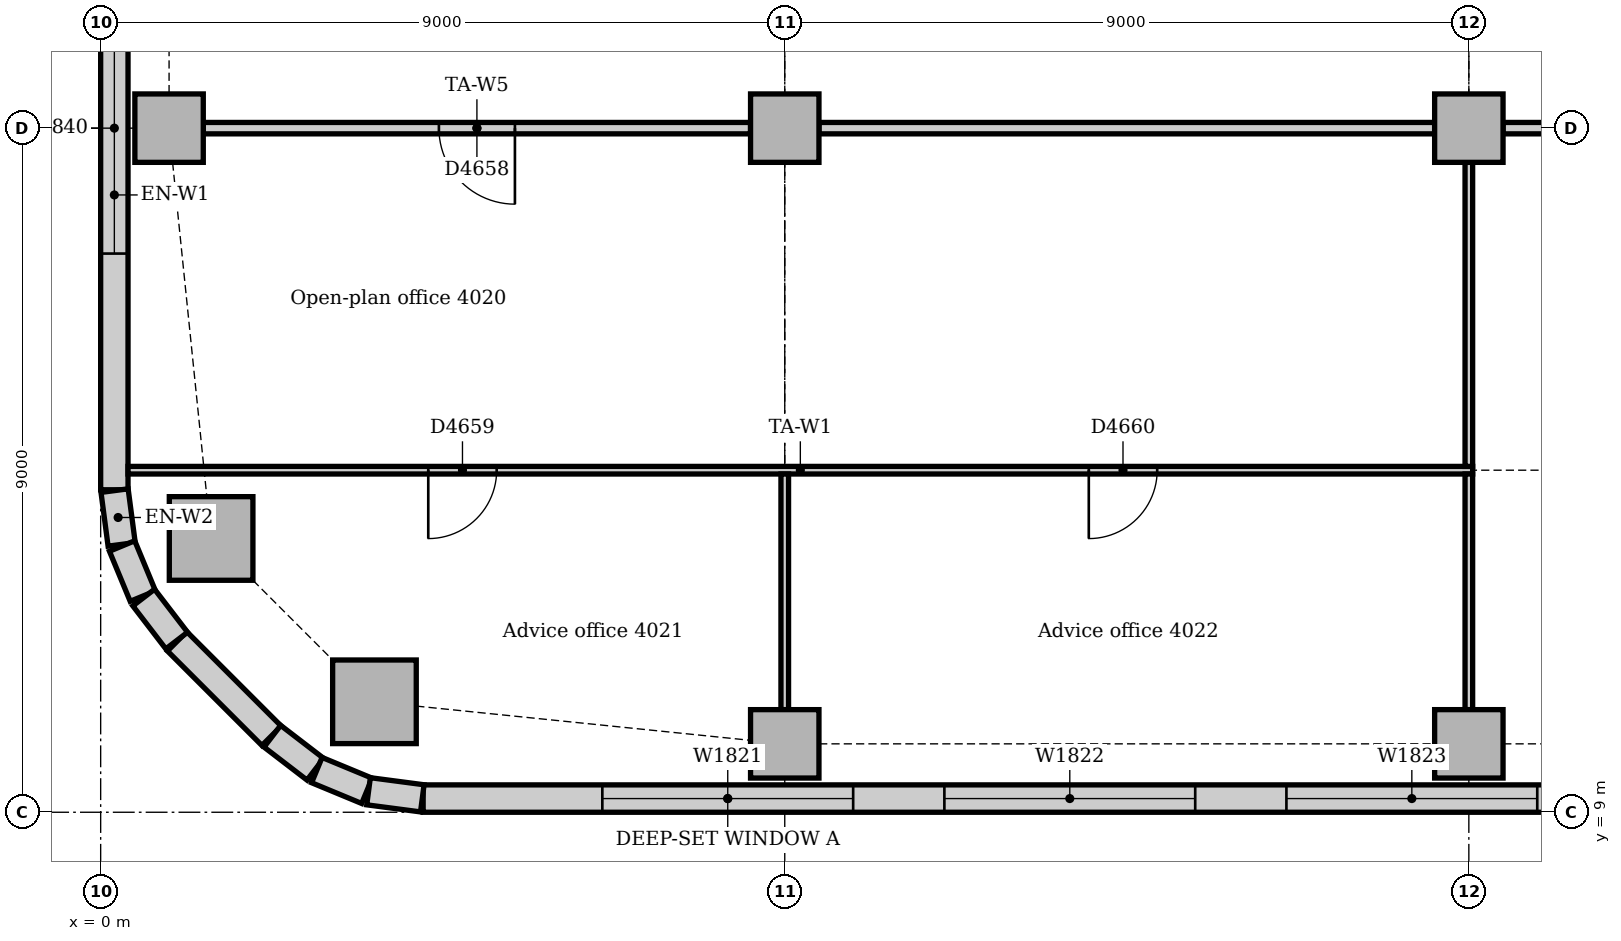
"""IFC4 building model, lengths in metres.
Left out: names, types, materials, properties, quantities, classifications, styles, units other than length and angle.
Written with IfcOpenShell. Run it as: python <this file> out.ifc"""

import sys

from ifc_helpers import new_model, si_unit, direction, frame, frame_2d, origin, origin_2d, place, context, subcontext, project, spatial, rectangle, extrude, element, fill, save


model = new_model("IFC4")
c1 = context("Model", 3, precision=1e-05, world=origin(), true_north=direction((0.0, 1.0)))
c2 = subcontext(c1, "Body", "Model", "MODEL_VIEW")
j1 = project(units=[si_unit("LENGTHUNIT", "METRE"), si_unit("PLANEANGLEUNIT", "RADIAN")], contexts=[c1])
p1 = place(None, origin())
s1 = spatial("IfcSite", under=j1, at=p1, CompositionType="ELEMENT")
p2 = place(p1, origin())
s2 = spatial("IfcBuilding", under=s1, at=p2, CompositionType="ELEMENT")
p3 = place(p2, frame((0.0, 0.0, 169.0)))
s3 = spatial("IfcBuildingStorey", under=s2, at=p3, CompositionType="ELEMENT", Elevation=169.0)
for number, where, z_axis, x_axis in (
    (1, (3.602, 10.453, 0.0), (0.0, 0.0, 1.0), (1.0, 0.0, 0.0)),
    (2, (1.453, 12.602, 0.0), (0.0, 0.0, 1.0), (1.0, 0.0, 0.0)),
):
    element("IfcColumn", number, at=place(p3, frame(where, z_axis=z_axis, x_axis=x_axis)), inside=s3, PredefinedType="COLUMN", context=c2, shape_type="SweptSolid", body=[
        extrude(rectangle(XDim=1.1, YDim=1.1, at=origin_2d()), origin(), (0.0, 0.0, 1.0), 3.85),
    ])
for number, where, z_axis, x_axis in (
    (3, (9.0, 9.9, 0.0), (0.0, 0.0, 1.0), (1.0, 0.0, 0.0)),
    (4, (18.0, 9.9, 0.0), (0.0, 0.0, 1.0), (1.0, 0.0, 0.0)),
    (5, (0.9, 18.0, 0.0), (0.0, 0.0, 1.0), (1.0, 0.0, 0.0)),
    (6, (9.0, 18.0, 0.0), (0.0, 0.0, 1.0), (1.0, 0.0, 0.0)),
    (7, (18.0, 18.0, 0.0), (0.0, 0.0, 1.0), (1.0, 0.0, 0.0)),
):
    element("IfcColumn", number, at=place(p3, frame(where, z_axis=z_axis, x_axis=x_axis)), inside=s3, PredefinedType="COLUMN", context=c2, shape_type="SweptSolid", body=[
        extrude(rectangle(XDim=0.9, YDim=0.9, at=origin_2d()), origin(), (0.0, 0.0, 1.0), 3.85),
    ])
p4 = place(p3, frame((4.243, 9.18, 0.0), z_axis=(0.0, 0.0, 1.0), x_axis=(1.0, 0.0, 0.0)))
e8 = element("IfcWall", 8, at=p4, inside=s3, PredefinedType="STANDARD", context=c2, shape_type="SweptSolid", body=[
    extrude(rectangle(XDim=30.515, YDim=0.36, at=frame_2d((15.257, 0.0))), origin(), (0.0, 0.0, 1.0), 3.85),
])
p5 = place(p4, frame((2.357, 0.0, 0.9)))
e9 = element("IfcOpeningElement", 9, at=p5, cuts=e8, PredefinedType="OPENING", context=c2, shape_type="SweptSolid", body=[
    extrude(rectangle(XDim=3.3, YDim=1.6, at=frame_2d((1.65, 0.8))), frame((0.0, 0.19, 0.0), z_axis=(0.0, -1.0, 0.0), x_axis=(1.0, 0.0, 0.0)), (0.0, 0.0, 1.0), 0.38),
])
p6 = place(p4, frame((6.857, 0.0, 0.9)))
e10 = element("IfcOpeningElement", 10, at=p6, cuts=e8, PredefinedType="OPENING", context=c2, shape_type="SweptSolid", body=[
    extrude(rectangle(XDim=3.3, YDim=1.6, at=frame_2d((1.65, 0.8))), frame((0.0, 0.19, 0.0), z_axis=(0.0, -1.0, 0.0), x_axis=(1.0, 0.0, 0.0)), (0.0, 0.0, 1.0), 0.38),
])
p7 = place(p4, frame((11.357, 0.0, 0.9)))
e11 = element("IfcOpeningElement", 11, at=p7, cuts=e8, PredefinedType="OPENING", context=c2, shape_type="SweptSolid", body=[
    extrude(rectangle(XDim=3.3, YDim=1.6, at=frame_2d((1.65, 0.8))), frame((0.0, 0.19, 0.0), z_axis=(0.0, -1.0, 0.0), x_axis=(1.0, 0.0, 0.0)), (0.0, 0.0, 1.0), 0.38),
])
p8 = place(p4, frame((15.857, 0.0, 0.9)))
e12 = element("IfcOpeningElement", 12, at=p8, cuts=e8, PredefinedType="OPENING", context=c2, shape_type="SweptSolid", body=[
    extrude(rectangle(XDim=3.3, YDim=1.6, at=frame_2d((1.65, 0.8))), frame((0.0, 0.19, 0.0), z_axis=(0.0, -1.0, 0.0), x_axis=(1.0, 0.0, 0.0)), (0.0, 0.0, 1.0), 0.38),
])
p9 = place(p4, frame((20.357, 0.0, 0.9)))
e13 = element("IfcOpeningElement", 13, at=p9, cuts=e8, PredefinedType="OPENING", context=c2, shape_type="SweptSolid", body=[
    extrude(rectangle(XDim=3.3, YDim=1.6, at=frame_2d((1.65, 0.8))), frame((0.0, 0.19, 0.0), z_axis=(0.0, -1.0, 0.0), x_axis=(1.0, 0.0, 0.0)), (0.0, 0.0, 1.0), 0.38),
])
p10 = place(p4, frame((25.307, 0.0, 0.9)))
e14 = element("IfcOpeningElement", 14, at=p10, cuts=e8, PredefinedType="OPENING", context=c2, shape_type="SweptSolid", body=[
    extrude(rectangle(XDim=1.8, YDim=1.6, at=frame_2d((0.9, 0.8))), frame((0.0, 0.19, 0.0), z_axis=(0.0, -1.0, 0.0), x_axis=(1.0, 0.0, 0.0)), (0.0, 0.0, 1.0), 0.38),
])
p11 = place(p3, frame((0.18, 21.0, 0.0), z_axis=(0.0, 0.0, 1.0), x_axis=(0.0, -1.0, 0.0)))
e15 = element("IfcWall", 15, at=p11, inside=s3, PredefinedType="STANDARD", context=c2, shape_type="SweptSolid", body=[
    extrude(rectangle(XDim=7.757, YDim=0.36, at=frame_2d((3.879, 0.0))), origin(), (0.0, 0.0, 1.0), 3.85),
])
p12 = place(p11, frame((1.35, 0.0, 0.9)))
e16 = element("IfcOpeningElement", 16, at=p12, cuts=e15, PredefinedType="OPENING", context=c2, shape_type="SweptSolid", body=[
    extrude(rectangle(XDim=3.3, YDim=1.6, at=frame_2d((1.65, 0.8))), frame((0.0, 0.19, 0.0), z_axis=(0.0, -1.0, 0.0), x_axis=(1.0, 0.0, 0.0)), (0.0, 0.0, 1.0), 0.38),
])
p13 = place(p3, frame((1.006, 11.249, 0.0), z_axis=(0.0, 0.0, 1.0), x_axis=(0.707106781187, -0.707106781187, 0.0)))
e17 = element("IfcWall", 17, at=p13, inside=s3, PredefinedType="STANDARD", context=c2, shape_type="SweptSolid", body=[
    extrude(rectangle(XDim=1.757, YDim=0.36, at=frame_2d((0.879, 0.0))), origin(), (0.0, 0.0, 1.0), 3.85),
])
for number, where, z_axis, x_axis in (
    (18, (0.183, 13.231, 0.0), (0.0, 0.0, 1.0), (0.131, -0.991, 0.0)),
    (19, (0.282, 12.503, 0.0), (0.0, 0.0, 1.0), (0.383, -0.924, 0.0)),
):
    element("IfcWall", number, at=place(p3, frame(where, z_axis=z_axis, x_axis=x_axis)), inside=s3, PredefinedType="STANDARD", context=c2, shape_type="SweptSolid", body=[
        extrude(rectangle(XDim=0.713, YDim=0.36, at=frame_2d((0.356, 0.0))), origin(), (0.0, 0.0, 1.0), 3.85),
    ])
for number, where, z_axis, x_axis in (
    (20, (0.566, 11.825, 0.0), (0.0, 0.0, 1.0), (0.609, -0.793, 0.0)),
    (21, (2.259, 10.0, 0.0), (0.0, 0.0, 1.0), (0.793, -0.609, 0.0)),
):
    element("IfcWall", number, at=place(p3, frame(where, z_axis=z_axis, x_axis=x_axis)), inside=s3, PredefinedType="STANDARD", context=c2, shape_type="SweptSolid", body=[
        extrude(rectangle(XDim=0.713, YDim=0.36, at=frame_2d((0.357, 0.0))), origin(), (0.0, 0.0, 1.0), 3.85),
    ])
for number, where, z_axis, x_axis in (
    (22, (2.844, 9.555, 0.0), (0.0, 0.0, 1.0), (0.924, -0.383, 0.0)),
    (23, (3.524, 9.276, 0.0), (0.0, 0.0, 1.0), (0.991, -0.131, 0.0)),
):
    element("IfcWall", number, at=place(p3, frame(where, z_axis=z_axis, x_axis=x_axis)), inside=s3, PredefinedType="STANDARD", context=c2, shape_type="SweptSolid", body=[
        extrude(rectangle(XDim=0.713, YDim=0.36, at=frame_2d((0.356, 0.0))), origin(), (0.0, 0.0, 1.0), 3.85),
    ])
p14 = place(p3, frame((1.35, 18.0, 0.0), z_axis=(0.0, 0.0, 1.0), x_axis=(1.0, 0.0, 0.0)))
e24 = element("IfcWall", 24, at=p14, inside=s3, PredefinedType="PARTITIONING", context=c2, shape_type="SweptSolid", body=[
    extrude(rectangle(XDim=7.2, YDim=0.15, at=frame_2d((3.6, 0.0))), origin(), (0.0, 0.0, 1.0), 3.262),
])
p15 = place(p14, frame((3.1, 0.0, 0.0)))
e25 = element("IfcOpeningElement", 25, at=p15, cuts=e24, PredefinedType="OPENING", context=c2, shape_type="SweptSolid", body=[
    extrude(rectangle(XDim=1.0, YDim=2.1, at=frame_2d((0.5, 1.05))), frame((0.0, 0.085, 0.0), z_axis=(0.0, -1.0, 0.0), x_axis=(1.0, 0.0, 0.0)), (0.0, 0.0, 1.0), 0.17),
])
p16 = place(p3, frame((9.45, 18.0, 0.0), z_axis=(0.0, 0.0, 1.0), x_axis=(1.0, 0.0, 0.0)))
e26 = element("IfcWall", 26, at=p16, inside=s3, PredefinedType="PARTITIONING", context=c2, shape_type="SweptSolid", body=[
    extrude(rectangle(XDim=8.1, YDim=0.15, at=frame_2d((4.05, 0.0))), origin(), (0.0, 0.0, 1.0), 3.262),
])
p17 = place(p3, frame((18.45, 18.0, 0.0), z_axis=(0.0, 0.0, 1.0), x_axis=(1.0, 0.0, 0.0)))
e27 = element("IfcWall", 27, at=p17, inside=s3, PredefinedType="PARTITIONING", context=c2, shape_type="SweptSolid", body=[
    extrude(rectangle(XDim=8.1, YDim=0.15, at=frame_2d((4.05, 0.0))), origin(), (0.0, 0.0, 1.0), 3.262),
])
p18 = place(p17, frame((3.6, 0.0, 0.0)))
e28 = element("IfcOpeningElement", 28, at=p18, cuts=e27, PredefinedType="OPENING", context=c2, shape_type="SweptSolid", body=[
    extrude(rectangle(XDim=0.9, YDim=2.1, at=frame_2d((0.45, 1.05))), frame((0.0, 0.085, 0.0), z_axis=(0.0, -1.0, 0.0), x_axis=(1.0, 0.0, 0.0)), (0.0, 0.0, 1.0), 0.17),
])
p19 = place(p3, frame((0.36, 13.5, 0.0), z_axis=(0.0, 0.0, 1.0), x_axis=(1.0, 0.0, 0.0)))
e29 = element("IfcWall", 29, at=p19, inside=s3, PredefinedType="PARTITIONING", context=c2, shape_type="SweptSolid", body=[
    extrude(rectangle(XDim=17.69, YDim=0.1, at=frame_2d((8.845, 0.0))), origin(), (0.0, 0.0, 1.0), 3.4),
])
p20 = place(p19, frame((3.95, 0.0, 0.0)))
e30 = element("IfcOpeningElement", 30, at=p20, cuts=e29, PredefinedType="OPENING", context=c2, shape_type="SweptSolid", body=[
    extrude(rectangle(XDim=0.9, YDim=2.1, at=frame_2d((0.45, 1.05))), frame((0.0, 0.06, 0.0), z_axis=(0.0, -1.0, 0.0), x_axis=(1.0, 0.0, 0.0)), (0.0, 0.0, 1.0), 0.12),
])
p21 = place(p19, frame((12.64, 0.0, 0.0)))
e31 = element("IfcOpeningElement", 31, at=p21, cuts=e29, PredefinedType="OPENING", context=c2, shape_type="SweptSolid", body=[
    extrude(rectangle(XDim=0.9, YDim=2.1, at=frame_2d((0.45, 1.05))), frame((0.0, 0.06, 0.0), z_axis=(0.0, -1.0, 0.0), x_axis=(1.0, 0.0, 0.0)), (0.0, 0.0, 1.0), 0.12),
])
p22 = place(p3, frame((18.0, 10.35, 0.0), z_axis=(0.0, 0.0, 1.0), x_axis=(0.0, 1.0, 0.0)))
e32 = element("IfcWall", 32, at=p22, inside=s3, PredefinedType="PARTITIONING", context=c2, shape_type="SweptSolid", body=[
    extrude(rectangle(XDim=3.1, YDim=0.1, at=frame_2d((1.55, 0.0))), origin(), (0.0, 0.0, 1.0), 3.362),
])
p23 = place(p3, frame((18.0, 13.55, 0.0), z_axis=(0.0, 0.0, 1.0), x_axis=(0.0, 1.0, 0.0)))
e33 = element("IfcWall", 33, at=p23, inside=s3, PredefinedType="PARTITIONING", context=c2, shape_type="SweptSolid", body=[
    extrude(rectangle(XDim=4.0, YDim=0.1, at=frame_2d((2.0, 0.0))), origin(), (0.0, 0.0, 1.0), 3.362),
])
p24 = place(p3, frame((9.0, 10.35, 0.0), z_axis=(0.0, 0.0, 1.0), x_axis=(0.0, 1.0, 0.0)))
e34 = element("IfcWall", 34, at=p24, inside=s3, PredefinedType="PARTITIONING", context=c2, shape_type="SweptSolid", body=[
    extrude(rectangle(XDim=3.1, YDim=0.1, at=frame_2d((1.55, 0.0))), origin(), (0.0, 0.0, 1.0), 3.362),
])
p25 = place(p5, origin())
e35 = element("IfcWindow", 35, at=p25, inside=s3, PartitioningType="SINGLE_PANEL", PredefinedType="WINDOW", context=c2, shape_type="SweptSolid", body=[
    extrude(rectangle(XDim=3.3, YDim=1.6, at=frame_2d((1.65, 0.8))), frame((0.0, 0.13, 0.0), z_axis=(0.0, -1.0, 0.0), x_axis=(1.0, 0.0, 0.0)), (0.0, 0.0, 1.0), 0.06),
])
fill(e9, e35)
p26 = place(p6, origin())
e36 = element("IfcWindow", 36, at=p26, inside=s3, PartitioningType="SINGLE_PANEL", PredefinedType="WINDOW", context=c2, shape_type="SweptSolid", body=[
    extrude(rectangle(XDim=3.3, YDim=1.6, at=frame_2d((1.65, 0.8))), frame((0.0, 0.13, 0.0), z_axis=(0.0, -1.0, 0.0), x_axis=(1.0, 0.0, 0.0)), (0.0, 0.0, 1.0), 0.06),
])
fill(e10, e36)
p27 = place(p7, origin())
e37 = element("IfcWindow", 37, at=p27, inside=s3, PartitioningType="SINGLE_PANEL", PredefinedType="WINDOW", context=c2, shape_type="SweptSolid", body=[
    extrude(rectangle(XDim=3.3, YDim=1.6, at=frame_2d((1.65, 0.8))), frame((0.0, 0.13, 0.0), z_axis=(0.0, -1.0, 0.0), x_axis=(1.0, 0.0, 0.0)), (0.0, 0.0, 1.0), 0.06),
])
fill(e11, e37)
p28 = place(p12, origin())
e38 = element("IfcWindow", 38, at=p28, inside=s3, PartitioningType="SINGLE_PANEL", PredefinedType="WINDOW", context=c2, shape_type="SweptSolid", body=[
    extrude(rectangle(XDim=3.3, YDim=1.6, at=frame_2d((1.65, 0.8))), frame((0.0, 0.13, 0.0), z_axis=(0.0, -1.0, 0.0), x_axis=(1.0, 0.0, 0.0)), (0.0, 0.0, 1.0), 0.06),
])
fill(e16, e38)
p29 = place(p15, frame((1.0, 0.0, 0.0), z_axis=(0.0, 0.0, 1.0), x_axis=(-1.0, 0.0, 0.0)))
e39 = element("IfcDoor", 39, at=p29, inside=s3, OperationType="SINGLE_SWING_LEFT", PredefinedType="DOOR", context=c2, shape_type="SweptSolid", body=[
    extrude(rectangle(XDim=1.0, YDim=2.1, at=frame_2d((0.5, 1.05))), frame((0.0, 0.025, 0.0), z_axis=(0.0, -1.0, 0.0), x_axis=(1.0, 0.0, 0.0)), (0.0, 0.0, 1.0), 0.05),
])
fill(e25, e39)
p30 = place(p20, frame((0.9, 0.0, 0.0), z_axis=(0.0, 0.0, 1.0), x_axis=(-1.0, 0.0, 0.0)))
e40 = element("IfcDoor", 40, at=p30, inside=s3, OperationType="SINGLE_SWING_RIGHT", PredefinedType="DOOR", context=c2, shape_type="SweptSolid", body=[
    extrude(rectangle(XDim=0.9, YDim=2.1, at=frame_2d((0.45, 1.05))), frame((0.0, 0.025, 0.0), z_axis=(0.0, -1.0, 0.0), x_axis=(1.0, 0.0, 0.0)), (0.0, 0.0, 1.0), 0.05),
])
fill(e30, e40)
p31 = place(p21, frame((0.9, 0.0, 0.0), z_axis=(0.0, 0.0, 1.0), x_axis=(-1.0, 0.0, 0.0)))
e41 = element("IfcDoor", 41, at=p31, inside=s3, OperationType="SINGLE_SWING_RIGHT", PredefinedType="DOOR", context=c2, shape_type="SweptSolid", body=[
    extrude(rectangle(XDim=0.9, YDim=2.1, at=frame_2d((0.45, 1.05))), frame((0.0, 0.025, 0.0), z_axis=(0.0, -1.0, 0.0), x_axis=(1.0, 0.0, 0.0)), (0.0, 0.0, 1.0), 0.05),
])
fill(e31, e41)
save(model, sys.argv[1])
